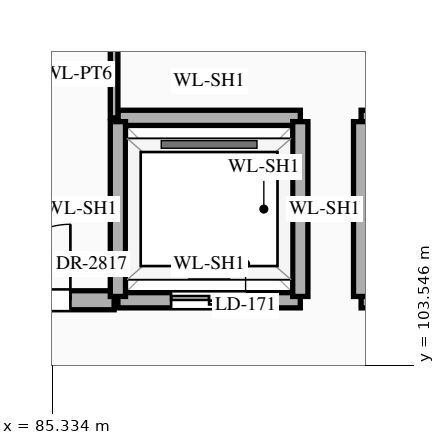
"""IFC4 building model, lengths in metres.
Left out: names, types, materials, properties, quantities, classifications, styles, units other than length and angle.
Written with IfcOpenShell. Run it as: python <this file> out.ifc"""

import sys

from ifc_helpers import new_model, si_unit, direction, frame, frame_2d, origin, place, context, subcontext, project, spatial, rectangle, extrude, element, fill, save


model = new_model("IFC4")
c1 = context("Model", 3, precision=1e-05, world=origin(), true_north=direction((0.0, 1.0)))
c2 = subcontext(c1, "Body", "Model", "MODEL_VIEW")
j1 = project(units=[si_unit("LENGTHUNIT", "METRE"), si_unit("PLANEANGLEUNIT", "RADIAN")], contexts=[c1])
p1 = place(None, origin())
s1 = spatial("IfcSite", under=j1, at=p1, CompositionType="ELEMENT")
p2 = place(p1, origin())
s2 = spatial("IfcBuilding", under=s1, at=p2, CompositionType="ELEMENT")
p3 = place(p2, frame((0.0, 0.0, 43.5)))
s3 = spatial("IfcBuildingStorey", under=s2, at=p3, CompositionType="ELEMENT", Elevation=43.5)
p4 = place(p3, frame((81.85, 104.4, 0.0), z_axis=(0.0, 0.0, 1.0), x_axis=(1.0, 0.0, 0.0)))
e1 = element("IfcWall", 1, at=p4, inside=s3, PredefinedType="STANDARD", context=c2, shape_type="SweptSolid", body=[
    extrude(rectangle(XDim=4.3, YDim=0.25, at=frame_2d((2.15, 0.0))), origin(), (0.0, 0.0, 1.0), 3.95),
])
p5 = place(p4, frame((0.525, 0.0, 0.0)))
e2 = element("IfcOpeningElement", 2, at=p5, cuts=e1, PredefinedType="OPENING", context=c2, shape_type="SweptSolid", body=[
    extrude(rectangle(XDim=1.1, YDim=2.2, at=frame_2d((0.55, 1.1))), frame((0.0, 0.137, 0.0), z_axis=(0.0, -1.0, 0.0), x_axis=(1.0, 0.0, 0.0)), (0.0, 0.0, 1.0), 0.274),
])
p6 = place(p4, frame((2.725, 0.0, 0.0)))
e3 = element("IfcOpeningElement", 3, at=p6, cuts=e1, PredefinedType="OPENING", context=c2, shape_type="SweptSolid", body=[
    extrude(rectangle(XDim=1.0, YDim=2.2, at=frame_2d((0.5, 1.1))), frame((0.0, 0.137, 0.0), z_axis=(0.0, -1.0, 0.0), x_axis=(1.0, 0.0, 0.0)), (0.0, 0.0, 1.0), 0.274),
])
p7 = place(p3, frame((86.2, 104.4, 0.0), z_axis=(0.0, 0.0, 1.0), x_axis=(1.0, 0.0, 0.0)))
e4 = element("IfcWall", 4, at=p7, inside=s3, PredefinedType="STANDARD", context=c2, shape_type="SweptSolid", body=[
    extrude(rectangle(XDim=2.4, YDim=0.2, at=frame_2d((1.2, 0.0))), origin(), (0.0, 0.0, 1.0), 3.95),
])
p8 = place(p7, frame((0.7, 0.0, 0.0)))
e5 = element("IfcOpeningElement", 5, at=p8, cuts=e4, PredefinedType="OPENING", context=c2, shape_type="SweptSolid", body=[
    extrude(rectangle(XDim=1.0, YDim=2.15, at=frame_2d((0.5, 1.075))), frame((0.0, 0.112, 0.0), z_axis=(0.0, -1.0, 0.0), x_axis=(1.0, 0.0, 0.0)), (0.0, 0.0, 1.0), 0.224),
])
p9 = place(p3, frame((89.4, 104.4, 0.0), z_axis=(0.0, 0.0, 1.0), x_axis=(1.0, 0.0, 0.0)))
e6 = element("IfcWall", 6, at=p9, inside=s3, PredefinedType="STANDARD", context=c2, shape_type="SweptSolid", body=[
    extrude(rectangle(XDim=2.4, YDim=0.2, at=frame_2d((1.2, 0.0))), origin(), (0.0, 0.0, 1.0), 3.95),
])
p10 = place(p9, frame((0.7, 0.0, 0.0)))
e7 = element("IfcOpeningElement", 7, at=p10, cuts=e6, PredefinedType="OPENING", context=c2, shape_type="SweptSolid", body=[
    extrude(rectangle(XDim=1.0, YDim=2.15, at=frame_2d((0.5, 1.075))), frame((0.0, 0.112, 0.0), z_axis=(0.0, -1.0, 0.0), x_axis=(1.0, 0.0, 0.0)), (0.0, 0.0, 1.0), 0.224),
])
for number, where, z_axis, x_axis in (
    (8, (86.2, 106.8, 0.0), (0.0, 0.0, 1.0), (1.0, 0.0, 0.0)),
    (9, (89.4, 106.8, 0.0), (0.0, 0.0, 1.0), (1.0, 0.0, 0.0)),
):
    element("IfcWall", number, at=place(p3, frame(where, z_axis=z_axis, x_axis=x_axis)), inside=s3, PredefinedType="STANDARD", context=c2, shape_type="SweptSolid", body=[
        extrude(rectangle(XDim=2.4, YDim=0.2, at=frame_2d((1.2, 0.0))), origin(), (0.0, 0.0, 1.0), 3.95),
    ])
p11 = place(p3, frame((86.15, 106.8, 0.0), z_axis=(0.0, 0.0, 1.0), x_axis=(0.0, 1.0, 0.0)))
e10 = element("IfcWall", 10, at=p11, inside=s3, PredefinedType="STANDARD", context=c2, shape_type="SweptSolid", body=[
    extrude(rectangle(XDim=1.15, YDim=0.1, at=frame_2d((0.575, 0.0))), origin(), (0.0, 0.0, 1.0), 3.95),
])
for number, where, z_axis, x_axis in (
    (11, (86.2, 104.45, 0.0), (0.0, 0.0, 1.0), (0.0, 1.0, 0.0)),
    (12, (88.6, 104.45, 0.0), (0.0, 0.0, 1.0), (0.0, 1.0, 0.0)),
    (13, (89.4, 104.45, 0.0), (0.0, 0.0, 1.0), (0.0, 1.0, 0.0)),
):
    element("IfcWall", number, at=place(p3, frame(where, z_axis=z_axis, x_axis=x_axis)), inside=s3, PredefinedType="STANDARD", context=c2, shape_type="SweptSolid", body=[
        extrude(rectangle(XDim=2.3, YDim=0.2, at=frame_2d((1.15, 0.0))), origin(), (0.0, 0.0, 1.0), 3.95),
    ])
p12 = place(p8, origin())
e14 = element("IfcDoor", 14, at=p12, inside=s3, OperationType="DOUBLE_DOOR_SLIDING", PredefinedType="DOOR", context=c2, shape_type="SweptSolid", body=[
    extrude(rectangle(XDim=1.0, YDim=2.15, at=frame_2d((0.5, 1.075))), frame((0.0, 0.025, 0.0), z_axis=(0.0, -1.0, 0.0), x_axis=(1.0, 0.0, 0.0)), (0.0, 0.0, 1.0), 0.05),
])
fill(e5, e14)
p13 = place(p6, origin())
e15 = element("IfcDoor", 15, at=p13, inside=s3, OperationType="SINGLE_SWING_RIGHT", PredefinedType="DOOR", context=c2, shape_type="SweptSolid", body=[
    extrude(rectangle(XDim=1.0, YDim=2.2, at=frame_2d((0.5, 1.1))), frame((0.0, 0.025, 0.0), z_axis=(0.0, -1.0, 0.0), x_axis=(1.0, 0.0, 0.0)), (0.0, 0.0, 1.0), 0.05),
])
fill(e3, e15)
save(model, sys.argv[1])
